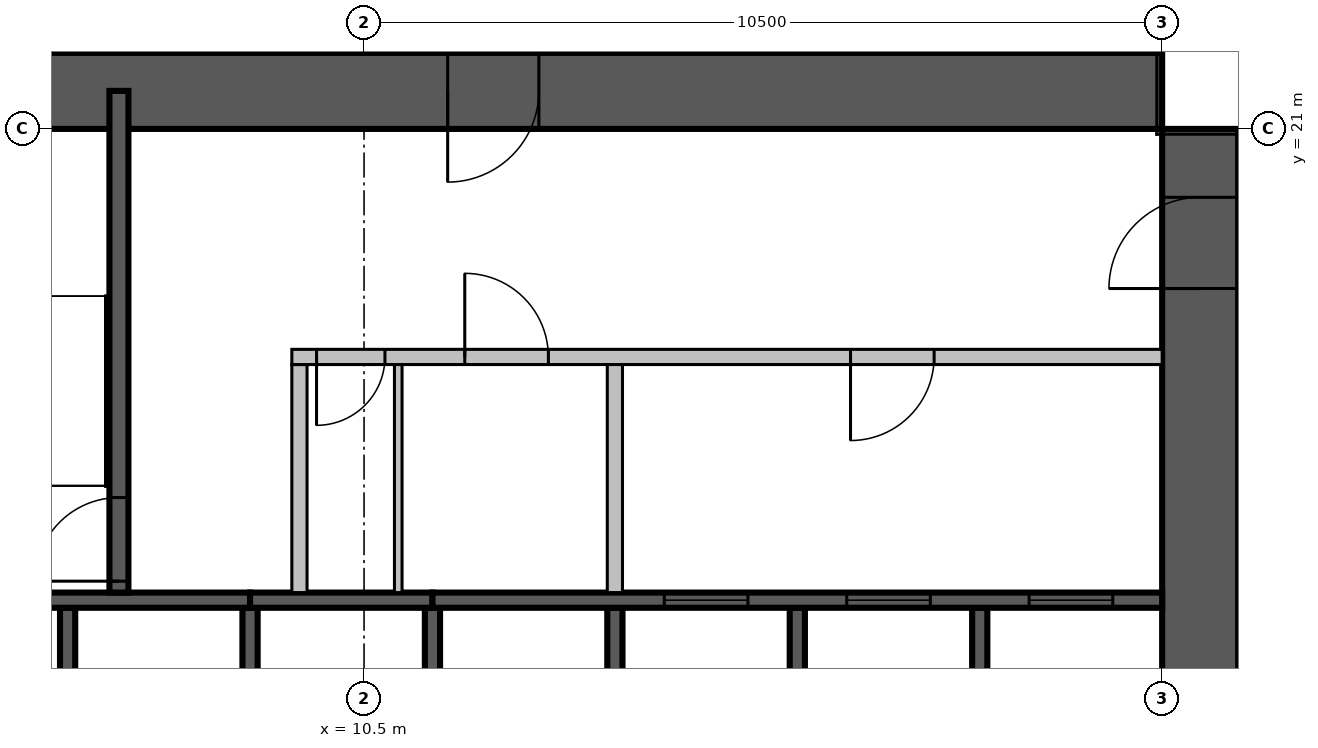
"""IFC4 building model, lengths in metres.
Left out: names, types, materials, properties, quantities, classifications, styles, units other than length and angle.
Written with IfcOpenShell. Run it as: python <this file> out.ifc"""

import sys

from ifc_helpers import new_model, si_unit, direction, frame, frame_2d, origin, place, context, subcontext, project, spatial, rectangle, extrude, source, transform, mapped, element, fill, save


model = new_model("IFC4")
c1 = context("Model", 3, precision=1e-05, world=origin(), true_north=direction((0.0, 1.0)))
c2 = subcontext(c1, "Body", "Model", "MODEL_VIEW")
j1 = project(units=[si_unit("LENGTHUNIT", "METRE"), si_unit("PLANEANGLEUNIT", "RADIAN")], contexts=[c1])
p1 = place(None, origin())
s1 = spatial("IfcSite", under=j1, at=p1, CompositionType="ELEMENT")
p2 = place(p1, origin())
s2 = spatial("IfcBuilding", under=s1, at=p2, CompositionType="ELEMENT")
p3 = place(p2, frame((0.0, 0.0, 162.3)))
s3 = spatial("IfcBuildingStorey", under=s2, at=p3, CompositionType="ELEMENT", Elevation=162.3)
p4 = place(p3, frame((21.5, 4.2, 0.0), z_axis=(0.0, 0.0, 1.0), x_axis=(0.0, 1.0, 0.0)))
e1 = element("IfcWall", 1, at=p4, inside=s3, PredefinedType="SHEAR", context=c2, shape_type="SweptSolid", body=[
    extrude(rectangle(XDim=16.8, YDim=1.0, at=frame_2d((8.4, 0.0))), origin(), (0.0, 0.0, 1.0), 8.0),
])
m1 = source(origin(), c2, "Body", "SweptSolid", [
    extrude(rectangle(XDim=2.2, YDim=2.1, at=frame_2d((1.1, 1.05))), frame((0.0, 0.51, 0.0), z_axis=(0.0, -1.0, 0.0), x_axis=(1.0, 0.0, 0.0)), (0.0, 0.0, 1.0), 1.02),
])
p5 = place(p4, frame((3.7, 0.0, 0.0)))
e2 = element("IfcOpeningElement", 2, at=p5, cuts=e1, PredefinedType="OPENING", context=c2, shape_type="MappedRepresentation", body=[
    mapped(m1, transform((0.0, 0.0, 0.0), scale=1.0)),
])
m2 = source(origin(), c2, "Body", "SweptSolid", [
    extrude(rectangle(XDim=1.2, YDim=2.1, at=frame_2d((0.6, 1.05))), frame((0.0, 0.51, 0.0), z_axis=(0.0, -1.0, 0.0), x_axis=(1.0, 0.0, 0.0)), (0.0, 0.0, 1.0), 1.02),
])
p6 = place(p4, frame((14.7, 0.0, 0.0)))
e3 = element("IfcOpeningElement", 3, at=p6, cuts=e1, PredefinedType="OPENING", context=c2, shape_type="MappedRepresentation", body=[
    mapped(m2, transform((0.0, 0.0, 0.0), scale=1.0)),
])
m3 = source(origin(), c2, "Body", "SweptSolid", [
    extrude(rectangle(XDim=16.8, YDim=1.0, at=frame_2d((8.4, 0.0))), origin(), (0.0, 0.0, 1.0), 8.0),
])
p7 = place(p3, frame((4.2, 21.5, 0.0), z_axis=(0.0, 0.0, 1.0), x_axis=(1.0, 0.0, 0.0)))
e4 = element("IfcWall", 4, at=p7, inside=s3, PredefinedType="SHEAR", context=c2, shape_type="MappedRepresentation", body=[
    mapped(m3, transform((0.0, 0.0, 0.0), scale=1.0)),
])
p8 = place(p7, frame((7.4, 0.0, 0.0)))
e5 = element("IfcOpeningElement", 5, at=p8, cuts=e4, PredefinedType="OPENING", context=c2, shape_type="MappedRepresentation", body=[
    mapped(m2, transform((0.0, 0.0, 0.0), scale=1.0)),
])
p9 = place(p3, frame((6.6, 11.7, 0.0), z_axis=(0.0, 0.0, 1.0), x_axis=(0.0, 1.0, 0.0)))
e6 = element("IfcWall", 6, at=p9, inside=s3, PredefinedType="SOLIDWALL", context=c2, shape_type="SweptSolid", body=[
    extrude(rectangle(XDim=3.0, YDim=0.2, at=frame_2d((1.5, 0.0))), origin(), (0.0, 0.0, 1.0), 8.0),
])
p10 = place(p3, frame((9.0, 11.7, 0.0), z_axis=(0.0, 0.0, 1.0), x_axis=(0.0, 1.0, 0.0)))
e7 = element("IfcWall", 7, at=p10, inside=s3, PredefinedType="SOLIDWALL", context=c2, shape_type="SweptSolid", body=[
    extrude(rectangle(XDim=3.0, YDim=0.2, at=frame_2d((1.5, 0.0))), origin(), (0.0, 0.0, 1.0), 7.6),
])
m4 = source(origin(), c2, "Body", "SweptSolid", [
    extrude(rectangle(XDim=3.0, YDim=0.2, at=frame_2d((1.5, 0.0))), origin(), (0.0, 0.0, 1.0), 7.6),
])
p11 = place(p3, frame((11.4, 11.7, 0.0), z_axis=(0.0, 0.0, 1.0), x_axis=(0.0, 1.0, 0.0)))
e8 = element("IfcWall", 8, at=p11, inside=s3, PredefinedType="SOLIDWALL", context=c2, shape_type="MappedRepresentation", body=[
    mapped(m4, transform((0.0, 0.0, 0.0), scale=1.0)),
])
m5 = source(origin(), c2, "Body", "SweptSolid", [
    extrude(rectangle(XDim=3.0, YDim=0.2, at=frame_2d((1.5, 0.0))), origin(), (0.0, 0.0, 1.0), 8.0),
])
for number, where, z_axis, x_axis in (
    (9, (13.8, 11.7, 0.0), (0.0, 0.0, 1.0), (0.0, 1.0, 0.0)),
    (10, (16.2, 11.7, 0.0), (0.0, 0.0, 1.0), (0.0, 1.0, 0.0)),
    (11, (18.6, 11.7, 0.0), (0.0, 0.0, 1.0), (0.0, 1.0, 0.0)),
):
    element("IfcWall", number, at=place(p3, frame(where, z_axis=z_axis, x_axis=x_axis)), inside=s3, PredefinedType="SOLIDWALL", context=c2, shape_type="MappedRepresentation", body=[
        mapped(m5, transform((0.0, 0.0, 0.0), scale=1.0)),
    ])
m6 = source(origin(), c2, "Body", "SweptSolid", [
    extrude(rectangle(XDim=4.8, YDim=0.2, at=frame_2d((2.4, 0.0))), origin(), (0.0, 0.0, 1.0), 8.0),
])
p12 = place(p3, frame((4.2, 14.8, 0.0), z_axis=(0.0, 0.0, 1.0), x_axis=(1.0, 0.0, 0.0)))
e12 = element("IfcWall", 12, at=p12, inside=s3, PredefinedType="SOLIDWALL", context=c2, shape_type="MappedRepresentation", body=[
    mapped(m6, transform((0.0, 0.0, 0.0), scale=1.0)),
])
m7 = source(origin(), c2, "Body", "SweptSolid", [
    extrude(rectangle(XDim=2.4, YDim=0.2, at=frame_2d((1.2, 0.0))), origin(), (0.0, 0.0, 1.0), 7.6),
])
p13 = place(p3, frame((9.0, 14.8, 0.0), z_axis=(0.0, 0.0, 1.0), x_axis=(1.0, 0.0, 0.0)))
e13 = element("IfcWall", 13, at=p13, inside=s3, PredefinedType="SOLIDWALL", context=c2, shape_type="MappedRepresentation", body=[
    mapped(m7, transform((0.0, 0.0, 0.0), scale=1.0)),
])
m8 = source(origin(), c2, "Body", "SweptSolid", [
    extrude(rectangle(XDim=9.6, YDim=0.2, at=frame_2d((4.8, 0.0))), origin(), (0.0, 0.0, 1.0), 8.0),
])
p14 = place(p3, frame((11.4, 14.8, 0.0), z_axis=(0.0, 0.0, 1.0), x_axis=(1.0, 0.0, 0.0)))
e14 = element("IfcWall", 14, at=p14, inside=s3, PredefinedType="SOLIDWALL", context=c2, shape_type="MappedRepresentation", body=[
    mapped(m8, transform((0.0, 0.0, 0.0), scale=1.0)),
])
m9 = source(origin(), c2, "Body", "SweptSolid", [
    extrude(rectangle(XDim=1.1, YDim=2.1, at=frame_2d((0.55, 1.05))), frame((0.0, 0.11, 0.0), z_axis=(0.0, -1.0, 0.0), x_axis=(1.0, 0.0, 0.0)), (0.0, 0.0, 1.0), 0.22),
])
p15 = place(p14, frame((3.05, 0.0, 0.0)))
e15 = element("IfcOpeningElement", 15, at=p15, cuts=e14, PredefinedType="OPENING", context=c2, shape_type="MappedRepresentation", body=[
    mapped(m9, transform((0.0, 0.0, 0.0), scale=1.0)),
])
p16 = place(p14, frame((5.45, 0.0, 0.0)))
e16 = element("IfcOpeningElement", 16, at=p16, cuts=e14, PredefinedType="OPENING", context=c2, shape_type="MappedRepresentation", body=[
    mapped(m9, transform((0.0, 0.0, 0.0), scale=1.0)),
])
p17 = place(p14, frame((7.85, 0.0, 0.0)))
e17 = element("IfcOpeningElement", 17, at=p17, cuts=e14, PredefinedType="OPENING", context=c2, shape_type="MappedRepresentation", body=[
    mapped(m9, transform((0.0, 0.0, 0.0), scale=1.0)),
])
p18 = place(p3, frame((7.275, 14.9, 0.0), z_axis=(0.0, 0.0, 1.0), x_axis=(0.0, 1.0, 0.0)))
e18 = element("IfcWall", 18, at=p18, inside=s3, PredefinedType="SOLIDWALL", context=c2, shape_type="SweptSolid", body=[
    extrude(rectangle(XDim=6.6, YDim=0.25, at=frame_2d((3.3, 0.0))), origin(), (0.0, 0.0, 1.0), 7.6),
])
m10 = source(origin(), c2, "Body", "SweptSolid", [
    extrude(rectangle(XDim=1.1, YDim=2.1, at=frame_2d((0.55, 1.05))), frame((0.0, 0.135, 0.0), z_axis=(0.0, -1.0, 0.0), x_axis=(1.0, 0.0, 0.0)), (0.0, 0.0, 1.0), 0.27),
])
p19 = place(p18, frame((0.15, 0.0, 0.0)))
e19 = element("IfcOpeningElement", 19, at=p19, cuts=e18, PredefinedType="OPENING", context=c2, shape_type="MappedRepresentation", body=[
    mapped(m10, transform((0.0, 0.0, 0.0), scale=1.0)),
])
p20 = place(p3, frame((9.65, 14.9, 0.0), z_axis=(0.0, 0.0, 1.0), x_axis=(0.0, 1.0, 0.0)))
e20 = element("IfcWall", 20, at=p20, inside=s3, PredefinedType="PARTITIONING", context=c2, shape_type="SweptSolid", body=[
    extrude(rectangle(XDim=3.0, YDim=0.2, at=frame_2d((1.5, 0.0))), origin(), (0.0, 0.0, 1.0), 7.6),
])
p21 = place(p3, frame((9.55, 18.0, 0.0), z_axis=(0.0, 0.0, 1.0), x_axis=(1.0, 0.0, 0.0)))
e21 = element("IfcWall", 21, at=p21, inside=s3, PredefinedType="PARTITIONING", context=c2, shape_type="SweptSolid", body=[
    extrude(rectangle(XDim=11.45, YDim=0.2, at=frame_2d((5.725, 0.0))), origin(), (0.0, 0.0, 1.0), 7.6),
])
m11 = source(origin(), c2, "Body", "SweptSolid", [
    extrude(rectangle(XDim=0.9, YDim=2.1, at=frame_2d((0.45, 1.05))), frame((0.0, 0.11, 0.0), z_axis=(0.0, -1.0, 0.0), x_axis=(1.0, 0.0, 0.0)), (0.0, 0.0, 1.0), 0.22),
])
p22 = place(p21, frame((0.325, 0.0, 0.0)))
e22 = element("IfcOpeningElement", 22, at=p22, cuts=e21, PredefinedType="OPENING", context=c2, shape_type="MappedRepresentation", body=[
    mapped(m11, transform((0.0, 0.0, 0.0), scale=1.0)),
])
p23 = place(p21, frame((2.275, 0.0, 0.0)))
e23 = element("IfcOpeningElement", 23, at=p23, cuts=e21, PredefinedType="OPENING", context=c2, shape_type="MappedRepresentation", body=[
    mapped(m9, transform((0.0, 0.0, 0.0), scale=1.0)),
])
p24 = place(p21, frame((7.35, 0.0, 0.0)))
e24 = element("IfcOpeningElement", 24, at=p24, cuts=e21, PredefinedType="OPENING", context=c2, shape_type="MappedRepresentation", body=[
    mapped(m9, transform((0.0, 0.0, 0.0), scale=1.0)),
])
m12 = source(origin(), c2, "Body", "SweptSolid", [
    extrude(rectangle(XDim=3.0, YDim=0.2, at=frame_2d((1.5, 0.0))), origin(), (0.0, 0.0, 1.0), 7.6),
])
p25 = place(p3, frame((13.8, 14.9, 0.0), z_axis=(0.0, 0.0, 1.0), x_axis=(0.0, 1.0, 0.0)))
e25 = element("IfcWall", 25, at=p25, inside=s3, PredefinedType="PARTITIONING", context=c2, shape_type="MappedRepresentation", body=[
    mapped(m12, transform((0.0, 0.0, 0.0), scale=1.0)),
])
p26 = place(p3, frame((10.95, 14.9, 0.0), z_axis=(0.0, 0.0, 1.0), x_axis=(0.0, 1.0, 0.0)))
e26 = element("IfcWall", 26, at=p26, inside=s3, PredefinedType="PARTITIONING", context=c2, shape_type="SweptSolid", body=[
    extrude(rectangle(XDim=3.0, YDim=0.1, at=frame_2d((1.5, 0.0))), origin(), (0.0, 0.0, 1.0), 7.6),
])
m13 = source(origin(), c2, "Body", "SweptSolid", [
    extrude(rectangle(XDim=1.1, YDim=2.1, at=frame_2d((0.55, 1.05))), frame((0.0, 0.025, 0.0), z_axis=(0.0, -1.0, 0.0), x_axis=(1.0, 0.0, 0.0)), (0.0, 0.0, 1.0), 0.05),
])
p27 = place(p15, origin())
e27 = element("IfcDoor", 27, at=p27, inside=s3, OperationType="SLIDING_TO_LEFT", PredefinedType="DOOR", context=c2, shape_type="MappedRepresentation", body=[
    mapped(m13, transform((0.0, 0.0, 0.0), scale=1.0)),
])
fill(e15, e27)
p28 = place(p16, origin())
e28 = element("IfcDoor", 28, at=p28, inside=s3, OperationType="SLIDING_TO_LEFT", PredefinedType="DOOR", context=c2, shape_type="MappedRepresentation", body=[
    mapped(m13, transform((0.0, 0.0, 0.0), scale=1.0)),
])
fill(e16, e28)
p29 = place(p17, origin())
e29 = element("IfcDoor", 29, at=p29, inside=s3, OperationType="SLIDING_TO_LEFT", PredefinedType="DOOR", context=c2, shape_type="MappedRepresentation", body=[
    mapped(m13, transform((0.0, 0.0, 0.0), scale=1.0)),
])
fill(e17, e29)
p30 = place(p19, origin())
e30 = element("IfcDoor", 30, at=p30, inside=s3, OperationType="SINGLE_SWING_LEFT", PredefinedType="DOOR", context=c2, shape_type="MappedRepresentation", body=[
    mapped(m13, transform((0.0, 0.0, 0.0), scale=1.0)),
])
fill(e19, e30)
m14 = source(origin(), c2, "Body", "SweptSolid", [
    extrude(rectangle(XDim=0.9, YDim=2.1, at=frame_2d((0.45, 1.05))), frame((0.0, 0.025, 0.0), z_axis=(0.0, -1.0, 0.0), x_axis=(1.0, 0.0, 0.0)), (0.0, 0.0, 1.0), 0.05),
])
p31 = place(p22, origin())
e31 = element("IfcDoor", 31, at=p31, inside=s3, OperationType="SINGLE_SWING_RIGHT", PredefinedType="DOOR", context=c2, shape_type="MappedRepresentation", body=[
    mapped(m14, transform((0.0, 0.0, 0.0), scale=1.0)),
])
fill(e22, e31)
p32 = place(p23, origin())
e32 = element("IfcDoor", 32, at=p32, inside=s3, OperationType="SINGLE_SWING_LEFT", PredefinedType="DOOR", context=c2, shape_type="MappedRepresentation", body=[
    mapped(m13, transform((0.0, 0.0, 0.0), scale=1.0)),
])
fill(e23, e32)
p33 = place(p24, origin())
e33 = element("IfcDoor", 33, at=p33, inside=s3, OperationType="SINGLE_SWING_RIGHT", PredefinedType="DOOR", context=c2, shape_type="MappedRepresentation", body=[
    mapped(m13, transform((0.0, 0.0, 0.0), scale=1.0)),
])
fill(e24, e33)
m15 = source(origin(), c2, "Body", "SweptSolid", [
    extrude(rectangle(XDim=1.2, YDim=2.1, at=frame_2d((0.6, 1.05))), frame((0.0, 0.025, 0.0), z_axis=(0.0, -1.0, 0.0), x_axis=(1.0, 0.0, 0.0)), (0.0, 0.0, 1.0), 0.05),
])
p34 = place(p8, origin())
e34 = element("IfcDoor", 34, at=p34, inside=s3, OperationType="SINGLE_SWING_RIGHT", PredefinedType="DOOR", context=c2, shape_type="MappedRepresentation", body=[
    mapped(m15, transform((0.0, 0.0, 0.0), scale=1.0)),
])
fill(e5, e34)
p35 = place(p6, origin())
e35 = element("IfcDoor", 35, at=p35, inside=s3, OperationType="SINGLE_SWING_LEFT", PredefinedType="DOOR", context=c2, shape_type="MappedRepresentation", body=[
    mapped(m15, transform((0.0, 0.0, 0.0), scale=1.0)),
])
fill(e3, e35)
save(model, sys.argv[1])
